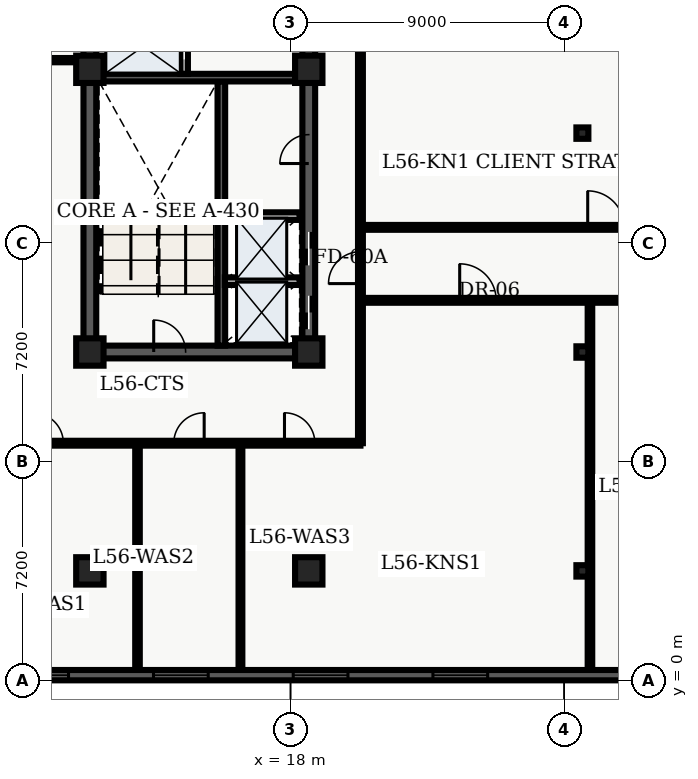
"""IFC4 building model, lengths in metres.
Left out: names, types, materials, properties, quantities, classifications, styles, units other than length and angle.
Written with IfcOpenShell. Run it as: python <this file> out.ifc"""

import sys

from ifc_helpers import new_model, entity, si_unit, converted_unit, direction, frame, origin_with_axes, origin_2d_with_axis, place, context, subcontext, project, spatial, polyline, rectangle, i_section, outline, extrude, element, fill, save


model = new_model("IFC4")
c1 = context("Model", 3, precision=1e-05, world=origin_with_axes(), true_north=direction((0.0, 1.0)))
c2 = subcontext(c1, "Body", "Model", "MODEL_VIEW")
j1 = project(units=[si_unit("LENGTHUNIT", "METRE"), converted_unit("PLANEANGLEUNIT", "DEGREE", entity("IfcPlaneAngleMeasure", 0.017), si_unit("PLANEANGLEUNIT", "RADIAN"), dimensions=[0, 0, 0, 0, 0, 0, 0])], contexts=[c1])
p1 = place(None, origin_with_axes())
s1 = spatial("IfcSite", under=j1, at=p1, CompositionType="ELEMENT")
p2 = place(p1, origin_with_axes())
s2 = spatial("IfcBuilding", under=s1, at=p2, CompositionType="ELEMENT")
p3 = place(p2, frame((0.0, 0.0, 228.6), z_axis=(0.0, 0.0, 1.0), x_axis=(1.0, 0.0, 0.0)))
s3 = spatial("IfcBuildingStorey", under=s2, at=p3, CompositionType="ELEMENT", Elevation=228.6)
p4 = place(p3, frame((11.4, 10.8, 0.0), z_axis=(0.0, 0.0, 1.0), x_axis=(0.0, 1.0, 0.0)))
e1 = element("IfcWall", 1, at=p4, inside=s3, PredefinedType="SHEAR", context=c2, shape_type="SweptSolid", body=[
    extrude(outline(polyline([(0.0, -0.21), (27.0, -0.21), (27.0, 0.21), (0.0, 0.21), (0.0, -0.21)])), origin_with_axes(), (0.0, 0.0, 1.0), 3.66),
])
p5 = place(p3, frame((11.4, 10.8, 0.0), z_axis=(0.0, 0.0, 1.0), x_axis=(1.0, 0.0, 0.0)))
e2 = element("IfcWall", 2, at=p5, inside=s3, PredefinedType="SHEAR", context=c2, shape_type="SweptSolid", body=[
    extrude(outline(polyline([(0.0, -0.21), (7.2, -0.21), (7.2, 0.21), (0.0, 0.21), (0.0, -0.21)])), origin_with_axes(), (0.0, 0.0, 1.0), 3.66),
])
p6 = place(p5, frame((2.625, 0.0, 0.0), z_axis=(0.0, 0.0, 1.0), x_axis=(1.0, 0.0, 0.0)))
e3 = element("IfcOpeningElement", 3, at=p6, cuts=e2, PredefinedType="OPENING", context=c2, shape_type="SweptSolid", body=[
    extrude(rectangle(XDim=1.05, YDim=0.44, at=origin_2d_with_axis()), origin_with_axes(), (0.0, 0.0, 1.0), 2.15),
])
p7 = place(p3, frame((18.6, 10.8, 0.0), z_axis=(0.0, 0.0, 1.0), x_axis=(0.0, 1.0, 0.0)))
e4 = element("IfcWall", 4, at=p7, inside=s3, PredefinedType="SHEAR", context=c2, shape_type="SweptSolid", body=[
    extrude(outline(polyline([(0.0, -0.21), (13.5, -0.21), (13.5, 0.21), (0.0, 0.21), (0.0, -0.21)])), origin_with_axes(), (0.0, 0.0, 1.0), 3.66),
])
p8 = place(p7, frame((1.3, 0.0, 0.0), z_axis=(0.0, 0.0, 1.0), x_axis=(1.0, 0.0, 0.0)))
e5 = element("IfcOpeningElement", 5, at=p8, cuts=e4, PredefinedType="OPENING", context=c2, shape_type="SweptSolid", body=[
    extrude(rectangle(XDim=1.1, YDim=0.44, at=origin_2d_with_axis()), origin_with_axes(), (0.0, 0.0, 1.0), 2.15),
])
p9 = place(p7, frame((3.4, 0.0, 0.0), z_axis=(0.0, 0.0, 1.0), x_axis=(1.0, 0.0, 0.0)))
e6 = element("IfcOpeningElement", 6, at=p9, cuts=e4, PredefinedType="OPENING", context=c2, shape_type="SweptSolid", body=[
    extrude(rectangle(XDim=1.1, YDim=0.44, at=origin_2d_with_axis()), origin_with_axes(), (0.0, 0.0, 1.0), 2.15),
])
p10 = place(p7, frame((11.125, 0.0, 0.0), z_axis=(0.0, 0.0, 1.0), x_axis=(1.0, 0.0, 0.0)))
e7 = element("IfcOpeningElement", 7, at=p10, cuts=e4, PredefinedType="OPENING", context=c2, shape_type="SweptSolid", body=[
    extrude(rectangle(XDim=1.05, YDim=0.44, at=origin_2d_with_axis()), origin_with_axes(), (0.0, 0.0, 1.0), 2.15),
])
p11 = place(p7, frame((6.675, 0.0, 0.0), z_axis=(0.0, 0.0, 1.0), x_axis=(1.0, 0.0, 0.0)))
e8 = element("IfcOpeningElement", 8, at=p11, cuts=e4, PredefinedType="OPENING", context=c2, shape_type="SweptSolid", body=[
    extrude(rectangle(XDim=0.95, YDim=0.44, at=origin_2d_with_axis()), origin_with_axes(), (0.0, 0.0, 1.0), 2.15),
])
p12 = place(p3, frame((15.725, 11.01, 0.0), z_axis=(0.0, 0.0, 1.0), x_axis=(0.0, 1.0, 0.0)))
e9 = element("IfcWall", 9, at=p12, inside=s3, PredefinedType="SHEAR", context=c2, shape_type="SweptSolid", body=[
    extrude(outline(polyline([(0.0, -0.125), (8.69, -0.125), (8.69, 0.125), (0.0, 0.125), (0.0, -0.125)])), origin_with_axes(), (0.0, 0.0, 1.0), 3.66),
])
p13 = place(p3, frame((11.61, 19.825, 0.0), z_axis=(0.0, 0.0, 1.0), x_axis=(1.0, 0.0, 0.0)))
e10 = element("IfcWall", 10, at=p13, inside=s3, PredefinedType="SHEAR", context=c2, shape_type="SweptSolid", body=[
    extrude(outline(polyline([(0.0, -0.125), (6.78, -0.125), (6.78, 0.125), (0.0, 0.125), (0.0, -0.125)])), origin_with_axes(), (0.0, 0.0, 1.0), 3.66),
])
p14 = place(p3, frame((14.5, 19.95, 0.0), z_axis=(0.0, 0.0, 1.0), x_axis=(0.0, 1.0, 0.0)))
e11 = element("IfcWall", 11, at=p14, inside=s3, PredefinedType="SOLIDWALL", context=c2, shape_type="SweptSolid", body=[
    extrude(outline(polyline([(0.0, -0.125), (6.25, -0.125), (6.25, 0.125), (0.0, 0.125), (0.0, -0.125)])), origin_with_axes(), (0.0, 0.0, 1.0), 2.7),
])
p15 = place(p14, frame((1.025, 0.0, 0.0), z_axis=(0.0, 0.0, 1.0), x_axis=(1.0, 0.0, 0.0)))
e12 = element("IfcOpeningElement", 12, at=p15, cuts=e11, PredefinedType="OPENING", context=c2, shape_type="SweptSolid", body=[
    extrude(rectangle(XDim=1.1, YDim=0.27, at=origin_2d_with_axis()), origin_with_axes(), (0.0, 0.0, 1.0), 2.15),
])
p16 = place(p14, frame((2.975, 0.0, 0.0), z_axis=(0.0, 0.0, 1.0), x_axis=(1.0, 0.0, 0.0)))
e13 = element("IfcOpeningElement", 13, at=p16, cuts=e11, PredefinedType="OPENING", context=c2, shape_type="SweptSolid", body=[
    extrude(rectangle(XDim=1.1, YDim=0.27, at=origin_2d_with_axis()), origin_with_axes(), (0.0, 0.0, 1.0), 2.15),
])
p17 = place(p14, frame((5.425, 0.0, 0.0), z_axis=(0.0, 0.0, 1.0), x_axis=(1.0, 0.0, 0.0)))
e14 = element("IfcOpeningElement", 14, at=p17, cuts=e11, PredefinedType="OPENING", context=c2, shape_type="SweptSolid", body=[
    extrude(rectangle(XDim=1.2, YDim=0.27, at=origin_2d_with_axis()), origin_with_axes(), (0.0, 0.0, 1.0), 2.15),
])
for number, where, z_axis, x_axis in (
    (15, (11.4, 3.6, 0.0), (0.0, 0.0, 1.0), (1.0, 0.0, 0.0)),
    (16, (11.4, 10.8, 0.0), (0.0, 0.0, 1.0), (1.0, 0.0, 0.0)),
    (17, (11.4, 20.1, 0.0), (0.0, 0.0, 1.0), (1.0, 0.0, 0.0)),
    (18, (18.6, 3.6, 0.0), (0.0, 0.0, 1.0), (1.0, 0.0, 0.0)),
    (19, (18.6, 10.8, 0.0), (0.0, 0.0, 1.0), (1.0, 0.0, 0.0)),
    (20, (18.6, 20.1, 0.0), (0.0, 0.0, 1.0), (1.0, 0.0, 0.0)),
):
    element("IfcColumn", number, at=place(p3, frame(where, z_axis=z_axis, x_axis=x_axis)), inside=s3, PredefinedType="COLUMN", context=c2, shape_type="SweptSolid", body=[
        extrude(rectangle(XDim=0.9, YDim=0.9, at=origin_2d_with_axis()), origin_with_axes(), (0.0, 0.0, 1.0), 3.9),
    ])
for number, where, z_axis, x_axis in (
    (21, (27.6, 3.6, 0.0), (0.0, 0.0, 1.0), (1.0, 0.0, 0.0)),
    (22, (27.6, 10.8, 0.0), (0.0, 0.0, 1.0), (1.0, 0.0, 0.0)),
    (23, (27.6, 18.0, 0.0), (0.0, 0.0, 1.0), (1.0, 0.0, 0.0)),
):
    element("IfcColumn", number, at=place(p3, frame(where, z_axis=z_axis, x_axis=x_axis)), inside=s3, PredefinedType="COLUMN", context=c2, shape_type="SweptSolid", body=[
        extrude(i_section(OverallWidth=0.394, OverallDepth=0.375, WebThickness=0.017, FlangeThickness=0.028, FilletRadius=0.02, at=origin_2d_with_axis()), origin_with_axes(), (0.0, 0.0, 1.0), 3.9),
    ])
for number, where, z_axis, x_axis in (
    (24, (15.84, 13.13, 0.0), (0.0, 0.0, 1.0), (1.0, 0.0, 0.0)),
    (25, (15.84, 15.27, 0.0), (0.0, 0.0, 1.0), (1.0, 0.0, 0.0)),
):
    element("IfcWall", number, at=place(p3, frame(where, z_axis=z_axis, x_axis=x_axis)), inside=s3, PredefinedType="SOLIDWALL", context=c2, shape_type="SweptSolid", body=[
        extrude(outline(polyline([(0.0, -0.125), (2.46, -0.125), (2.46, 0.125), (0.0, 0.125), (0.0, -0.125)])), origin_with_axes(), (0.0, 0.0, 1.0), 2.7),
    ])
p18 = place(p3, frame((9.52, 20.4, 0.0), z_axis=(0.0, 0.0, 1.0), x_axis=(1.0, 0.0, 0.0)))
e26 = element("IfcWall", 26, at=p18, inside=s3, PredefinedType="PARTITIONING", context=c2, shape_type="SweptSolid", body=[
    extrude(outline(polyline([(0.0, -0.07), (1.58, -0.07), (1.58, 0.07), (0.0, 0.07), (0.0, -0.07)])), origin_with_axes(), (0.0, 0.0, 1.0), 2.7),
])
p19 = place(p3, frame((7.1, 7.8, 0.0), z_axis=(0.0, 0.0, 1.0), x_axis=(1.0, 0.0, 0.0)))
e27 = element("IfcWall", 27, at=p19, inside=s3, PredefinedType="PARTITIONING", context=c2, shape_type="SweptSolid", body=[
    extrude(outline(polyline([(0.0, -0.08), (13.2, -0.08), (13.2, 0.08), (0.0, 0.08), (0.0, -0.08)])), origin_with_axes(), (0.0, 0.0, 1.0), 2.7),
])
p20 = place(p19, frame((2.929, 0.0, 0.0), z_axis=(0.0, 0.0, 1.0), x_axis=(1.0, 0.0, 0.0)))
e28 = element("IfcOpeningElement", 28, at=p20, cuts=e27, PredefinedType="OPENING", context=c2, shape_type="SweptSolid", body=[
    extrude(rectangle(XDim=1.0, YDim=0.18, at=origin_2d_with_axis()), origin_with_axes(), (0.0, 0.0, 1.0), 2.15),
])
p21 = place(p19, frame((7.56, 0.0, 0.0), z_axis=(0.0, 0.0, 1.0), x_axis=(1.0, 0.0, 0.0)))
e29 = element("IfcOpeningElement", 29, at=p21, cuts=e27, PredefinedType="OPENING", context=c2, shape_type="SweptSolid", body=[
    extrude(rectangle(XDim=1.0, YDim=0.18, at=origin_2d_with_axis()), origin_with_axes(), (0.0, 0.0, 1.0), 2.15),
])
p22 = place(p19, frame((11.201, 0.0, 0.0), z_axis=(0.0, 0.0, 1.0), x_axis=(1.0, 0.0, 0.0)))
e30 = element("IfcOpeningElement", 30, at=p22, cuts=e27, PredefinedType="OPENING", context=c2, shape_type="SweptSolid", body=[
    extrude(rectangle(XDim=1.0, YDim=0.18, at=origin_2d_with_axis()), origin_with_axes(), (0.0, 0.0, 1.0), 2.15),
])
p23 = place(p3, frame((20.3, 7.8, 0.0), z_axis=(0.0, 0.0, 1.0), x_axis=(0.0, 1.0, 0.0)))
e31 = element("IfcWall", 31, at=p23, inside=s3, PredefinedType="PARTITIONING", context=c2, shape_type="SweptSolid", body=[
    extrude(outline(polyline([(0.0, -0.08), (32.7, -0.08), (32.7, 0.08), (0.0, 0.08), (0.0, -0.08)])), origin_with_axes(), (0.0, 0.0, 1.0), 2.7),
])
p24 = place(p23, frame((14.556, 0.0, 0.0), z_axis=(0.0, 0.0, 1.0), x_axis=(1.0, 0.0, 0.0)))
e32 = element("IfcOpeningElement", 32, at=p24, cuts=e31, PredefinedType="OPENING", context=c2, shape_type="SweptSolid", body=[
    extrude(rectangle(XDim=0.9, YDim=0.18, at=origin_2d_with_axis()), origin_with_axes(), (0.0, 0.0, 1.0), 2.15),
])
p25 = place(p23, frame((18.551, 0.0, 0.0), z_axis=(0.0, 0.0, 1.0), x_axis=(1.0, 0.0, 0.0)))
e33 = element("IfcOpeningElement", 33, at=p25, cuts=e31, PredefinedType="OPENING", context=c2, shape_type="SweptSolid", body=[
    extrude(rectangle(XDim=1.0, YDim=0.18, at=origin_2d_with_axis()), origin_with_axes(), (0.0, 0.0, 1.0), 2.15),
])
p26 = place(p23, frame((22.226, 0.0, 0.0), z_axis=(0.0, 0.0, 1.0), x_axis=(1.0, 0.0, 0.0)))
e34 = element("IfcOpeningElement", 34, at=p26, cuts=e31, PredefinedType="OPENING", context=c2, shape_type="SweptSolid", body=[
    extrude(rectangle(XDim=1.0, YDim=0.18, at=origin_2d_with_axis()), origin_with_axes(), (0.0, 0.0, 1.0), 2.15),
])
p27 = place(p23, frame((25.754, 0.0, 0.0), z_axis=(0.0, 0.0, 1.0), x_axis=(1.0, 0.0, 0.0)))
e35 = element("IfcOpeningElement", 35, at=p27, cuts=e31, PredefinedType="OPENING", context=c2, shape_type="SweptSolid", body=[
    extrude(rectangle(XDim=1.0, YDim=0.18, at=origin_2d_with_axis()), origin_with_axes(), (0.0, 0.0, 1.0), 2.15),
])
p28 = place(p23, frame((5.775, 0.0, 0.0), z_axis=(0.0, 0.0, 1.0), x_axis=(1.0, 0.0, 0.0)))
e36 = element("IfcOpeningElement", 36, at=p28, cuts=e31, PredefinedType="OPENING", context=c2, shape_type="SweptSolid", body=[
    extrude(rectangle(XDim=1.05, YDim=0.18, at=origin_2d_with_axis()), origin_with_axes(), (0.0, 0.0, 1.0), 2.15),
])
p29 = place(p3, frame((12.967, 0.335, 0.0), z_axis=(0.0, 0.0, 1.0), x_axis=(0.0, 1.0, 0.0)))
e37 = element("IfcWall", 37, at=p29, inside=s3, PredefinedType="PARTITIONING", context=c2, shape_type="SweptSolid", body=[
    extrude(outline(polyline([(0.0, -0.075), (7.365, -0.075), (7.365, 0.075), (0.0, 0.075), (0.0, -0.075)])), origin_with_axes(), (0.0, 0.0, 1.0), 2.7),
])
p30 = place(p3, frame((16.353, 0.335, 0.0), z_axis=(0.0, 0.0, 1.0), x_axis=(0.0, 1.0, 0.0)))
e38 = element("IfcWall", 38, at=p30, inside=s3, PredefinedType="PARTITIONING", context=c2, shape_type="SweptSolid", body=[
    extrude(outline(polyline([(0.0, -0.062), (7.365, -0.062), (7.365, 0.062), (0.0, 0.062), (0.0, -0.062)])), origin_with_axes(), (0.0, 0.0, 1.0), 2.7),
])
p31 = place(p3, frame((20.3, 12.5, 0.0), z_axis=(0.0, 0.0, 1.0), x_axis=(1.0, 0.0, 0.0)))
e39 = element("IfcWall", 39, at=p31, inside=s3, PredefinedType="PARTITIONING", context=c2, shape_type="SweptSolid", body=[
    extrude(outline(polyline([(0.0, -0.08), (16.05, -0.08), (16.05, 0.08), (0.0, 0.08), (0.0, -0.08)])), origin_with_axes(), (0.0, 0.0, 1.0), 2.7),
])
p32 = place(p31, frame((3.865, 0.0, 0.0), z_axis=(0.0, 0.0, 1.0), x_axis=(1.0, 0.0, 0.0)))
e40 = element("IfcOpeningElement", 40, at=p32, cuts=e39, PredefinedType="OPENING", context=c2, shape_type="SweptSolid", body=[
    extrude(rectangle(XDim=1.2, YDim=0.18, at=origin_2d_with_axis()), origin_with_axes(), (0.0, 0.0, 1.0), 2.2),
])
p33 = place(p31, frame((9.48, 0.0, 0.0), z_axis=(0.0, 0.0, 1.0), x_axis=(1.0, 0.0, 0.0)))
e41 = element("IfcOpeningElement", 41, at=p33, cuts=e39, PredefinedType="OPENING", context=c2, shape_type="SweptSolid", body=[
    extrude(rectangle(XDim=1.0, YDim=0.18, at=origin_2d_with_axis()), origin_with_axes(), (0.0, 0.0, 1.0), 2.15),
])
p34 = place(p31, frame((13.691, 0.0, 0.0), z_axis=(0.0, 0.0, 1.0), x_axis=(1.0, 0.0, 0.0)))
e42 = element("IfcOpeningElement", 42, at=p34, cuts=e39, PredefinedType="OPENING", context=c2, shape_type="SweptSolid", body=[
    extrude(rectangle(XDim=1.0, YDim=0.18, at=origin_2d_with_axis()), origin_with_axes(), (0.0, 0.0, 1.0), 2.15),
])
p35 = place(p3, frame((20.3, 14.9, 0.0), z_axis=(0.0, 0.0, 1.0), x_axis=(1.0, 0.0, 0.0)))
e43 = element("IfcWall", 43, at=p35, inside=s3, PredefinedType="PARTITIONING", context=c2, shape_type="SweptSolid", body=[
    extrude(outline(polyline([(0.0, -0.08), (16.05, -0.08), (16.05, 0.08), (0.0, 0.08), (0.0, -0.08)])), origin_with_axes(), (0.0, 0.0, 1.0), 2.7),
])
p36 = place(p35, frame((8.075, 0.0, 0.0), z_axis=(0.0, 0.0, 1.0), x_axis=(1.0, 0.0, 0.0)))
e44 = element("IfcOpeningElement", 44, at=p36, cuts=e43, PredefinedType="OPENING", context=c2, shape_type="SweptSolid", body=[
    extrude(rectangle(XDim=1.2, YDim=0.18, at=origin_2d_with_axis()), origin_with_axes(), (0.0, 0.0, 1.0), 2.2),
])
p37 = place(p3, frame((27.849, 0.335, 0.0), z_axis=(0.0, 0.0, 1.0), x_axis=(0.0, 1.0, 0.0)))
e45 = element("IfcWall", 45, at=p37, inside=s3, PredefinedType="PARTITIONING", context=c2, shape_type="SweptSolid", body=[
    extrude(outline(polyline([(0.0, -0.075), (12.045, -0.075), (12.045, 0.075), (0.0, 0.075), (0.0, -0.075)])), origin_with_axes(), (0.0, 0.0, 1.0), 2.7),
])
p38 = place(p3, frame((49.46, 0.17, 0.0), z_axis=(0.0, 0.0, 1.0), x_axis=(-1.0, 0.0, 0.0)))
e46 = element("IfcWall", 46, at=p38, inside=s3, PredefinedType="SOLIDWALL", context=c2, shape_type="SweptSolid", body=[
    extrude(outline(polyline([(0.0, -0.17), (42.56, -0.17), (42.56, 0.17), (0.0, 0.17), (0.0, -0.17)])), origin_with_axes(), (0.0, 0.0, 1.0), 3.66),
])
p39 = place(p38, frame((2.898, 0.0, 0.45), z_axis=(0.0, 0.0, 1.0), x_axis=(1.0, 0.0, 0.0)))
e47 = element("IfcOpeningElement", 47, at=p39, cuts=e46, PredefinedType="OPENING", context=c2, shape_type="SweptSolid", body=[
    extrude(rectangle(XDim=1.8, YDim=0.36, at=origin_2d_with_axis()), origin_with_axes(), (0.0, 0.0, 1.0), 2.1),
])
p40 = place(p38, frame((7.493, 0.0, 0.45), z_axis=(0.0, 0.0, 1.0), x_axis=(1.0, 0.0, 0.0)))
e48 = element("IfcOpeningElement", 48, at=p40, cuts=e46, PredefinedType="OPENING", context=c2, shape_type="SweptSolid", body=[
    extrude(rectangle(XDim=1.8, YDim=0.36, at=origin_2d_with_axis()), origin_with_axes(), (0.0, 0.0, 1.0), 2.1),
])
p41 = place(p38, frame((12.089, 0.0, 0.45), z_axis=(0.0, 0.0, 1.0), x_axis=(1.0, 0.0, 0.0)))
e49 = element("IfcOpeningElement", 49, at=p41, cuts=e46, PredefinedType="OPENING", context=c2, shape_type="SweptSolid", body=[
    extrude(rectangle(XDim=1.8, YDim=0.36, at=origin_2d_with_axis()), origin_with_axes(), (0.0, 0.0, 1.0), 2.1),
])
p42 = place(p38, frame((16.234, 0.0, 0.45), z_axis=(0.0, 0.0, 1.0), x_axis=(1.0, 0.0, 0.0)))
e50 = element("IfcOpeningElement", 50, at=p42, cuts=e46, PredefinedType="OPENING", context=c2, shape_type="SweptSolid", body=[
    extrude(rectangle(XDim=1.8, YDim=0.36, at=origin_2d_with_axis()), origin_with_axes(), (0.0, 0.0, 1.0), 2.1),
])
p43 = place(p38, frame((25.876, 0.0, 0.45), z_axis=(0.0, 0.0, 1.0), x_axis=(1.0, 0.0, 0.0)))
e51 = element("IfcOpeningElement", 51, at=p43, cuts=e46, PredefinedType="OPENING", context=c2, shape_type="SweptSolid", body=[
    extrude(rectangle(XDim=1.8, YDim=0.36, at=origin_2d_with_axis()), origin_with_axes(), (0.0, 0.0, 1.0), 2.1),
])
p44 = place(p38, frame((30.471, 0.0, 0.45), z_axis=(0.0, 0.0, 1.0), x_axis=(1.0, 0.0, 0.0)))
e52 = element("IfcOpeningElement", 52, at=p44, cuts=e46, PredefinedType="OPENING", context=c2, shape_type="SweptSolid", body=[
    extrude(rectangle(XDim=1.8, YDim=0.36, at=origin_2d_with_axis()), origin_with_axes(), (0.0, 0.0, 1.0), 2.1),
])
p45 = place(p38, frame((35.067, 0.0, 0.45), z_axis=(0.0, 0.0, 1.0), x_axis=(1.0, 0.0, 0.0)))
e53 = element("IfcOpeningElement", 53, at=p45, cuts=e46, PredefinedType="OPENING", context=c2, shape_type="SweptSolid", body=[
    extrude(rectangle(XDim=1.8, YDim=0.36, at=origin_2d_with_axis()), origin_with_axes(), (0.0, 0.0, 1.0), 2.1),
])
p46 = place(p38, frame((39.662, 0.0, 0.45), z_axis=(0.0, 0.0, 1.0), x_axis=(1.0, 0.0, 0.0)))
e54 = element("IfcOpeningElement", 54, at=p46, cuts=e46, PredefinedType="OPENING", context=c2, shape_type="SweptSolid", body=[
    extrude(rectangle(XDim=1.8, YDim=0.36, at=origin_2d_with_axis()), origin_with_axes(), (0.0, 0.0, 1.0), 2.1),
])
p47 = place(p7, frame((1.3, 0.0, 0.0), z_axis=(0.0, 0.0, 1.0), x_axis=(1.0, 0.0, 0.0)))
e55 = element("IfcDoor", 55, at=p47, inside=s3, OperationType="SLIDING_TO_LEFT", PredefinedType="DOOR", context=c2, shape_type="SweptSolid", body=[
    extrude(rectangle(XDim=1.1, YDim=0.09, at=origin_2d_with_axis()), origin_with_axes(), (0.0, 0.0, 1.0), 2.15),
])
fill(e5, e55)
p48 = place(p7, frame((3.4, 0.0, 0.0), z_axis=(0.0, 0.0, 1.0), x_axis=(1.0, 0.0, 0.0)))
e56 = element("IfcDoor", 56, at=p48, inside=s3, OperationType="SLIDING_TO_RIGHT", PredefinedType="DOOR", context=c2, shape_type="SweptSolid", body=[
    extrude(rectangle(XDim=1.1, YDim=0.09, at=origin_2d_with_axis()), origin_with_axes(), (0.0, 0.0, 1.0), 2.15),
])
fill(e6, e56)
p49 = place(p14, frame((1.025, 0.0, 0.0), z_axis=(0.0, 0.0, 1.0), x_axis=(1.0, 0.0, 0.0)))
e57 = element("IfcDoor", 57, at=p49, inside=s3, OperationType="SLIDING_TO_LEFT", PredefinedType="DOOR", context=c2, shape_type="SweptSolid", body=[
    extrude(rectangle(XDim=1.1, YDim=0.09, at=origin_2d_with_axis()), origin_with_axes(), (0.0, 0.0, 1.0), 2.15),
])
fill(e12, e57)
p50 = place(p5, frame((2.625, 0.0, 0.0), z_axis=(0.0, 0.0, 1.0), x_axis=(1.0, 0.0, 0.0)))
e58 = element("IfcDoor", 58, at=p50, inside=s3, OperationType="SINGLE_SWING_LEFT", PredefinedType="DOOR", context=c2, shape_type="SweptSolid", body=[
    extrude(rectangle(XDim=1.05, YDim=0.09, at=origin_2d_with_axis()), origin_with_axes(), (0.0, 0.0, 1.0), 2.15),
])
fill(e3, e58)
p51 = place(p7, frame((6.675, 0.0, 0.0), z_axis=(0.0, 0.0, 1.0), x_axis=(1.0, 0.0, 0.0)))
e59 = element("IfcDoor", 59, at=p51, inside=s3, OperationType="SINGLE_SWING_LEFT", PredefinedType="DOOR", context=c2, shape_type="SweptSolid", body=[
    extrude(rectangle(XDim=0.95, YDim=0.09, at=origin_2d_with_axis()), origin_with_axes(), (0.0, 0.0, 1.0), 2.15),
])
fill(e8, e59)
p52 = place(p19, frame((2.929, 0.0, 0.0), z_axis=(0.0, 0.0, 1.0), x_axis=(1.0, 0.0, 0.0)))
e60 = element("IfcDoor", 60, at=p52, inside=s3, OperationType="SINGLE_SWING_LEFT", PredefinedType="DOOR", context=c2, shape_type="SweptSolid", body=[
    extrude(rectangle(XDim=1.0, YDim=0.09, at=origin_2d_with_axis()), origin_with_axes(), (0.0, 0.0, 1.0), 2.15),
])
fill(e28, e60)
p53 = place(p19, frame((7.56, 0.0, 0.0), z_axis=(0.0, 0.0, 1.0), x_axis=(1.0, 0.0, 0.0)))
e61 = element("IfcDoor", 61, at=p53, inside=s3, OperationType="SINGLE_SWING_RIGHT", PredefinedType="DOOR", context=c2, shape_type="SweptSolid", body=[
    extrude(rectangle(XDim=1.0, YDim=0.09, at=origin_2d_with_axis()), origin_with_axes(), (0.0, 0.0, 1.0), 2.15),
])
fill(e29, e61)
p54 = place(p19, frame((11.201, 0.0, 0.0), z_axis=(0.0, 0.0, 1.0), x_axis=(1.0, 0.0, 0.0)))
e62 = element("IfcDoor", 62, at=p54, inside=s3, OperationType="SINGLE_SWING_LEFT", PredefinedType="DOOR", context=c2, shape_type="SweptSolid", body=[
    extrude(rectangle(XDim=1.0, YDim=0.09, at=origin_2d_with_axis()), origin_with_axes(), (0.0, 0.0, 1.0), 2.15),
])
fill(e30, e62)
p55 = place(p23, frame((5.775, 0.0, 0.0), z_axis=(0.0, 0.0, 1.0), x_axis=(1.0, 0.0, 0.0)))
e63 = element("IfcDoor", 63, at=p55, inside=s3, OperationType="SINGLE_SWING_LEFT", PredefinedType="DOOR", context=c2, shape_type="SweptSolid", body=[
    extrude(rectangle(XDim=1.05, YDim=0.09, at=origin_2d_with_axis()), origin_with_axes(), (0.0, 0.0, 1.0), 2.15),
])
fill(e36, e63)
p56 = place(p31, frame((3.865, 0.0, 0.0), z_axis=(0.0, 0.0, 1.0), x_axis=(1.0, 0.0, 0.0)))
e64 = element("IfcDoor", 64, at=p56, inside=s3, OperationType="SINGLE_SWING_LEFT", PredefinedType="DOOR", context=c2, shape_type="SweptSolid", body=[
    extrude(rectangle(XDim=1.2, YDim=0.09, at=origin_2d_with_axis()), origin_with_axes(), (0.0, 0.0, 1.0), 2.2),
])
fill(e40, e64)
p57 = place(p35, frame((8.075, 0.0, 0.0), z_axis=(0.0, 0.0, 1.0), x_axis=(1.0, 0.0, 0.0)))
e65 = element("IfcDoor", 65, at=p57, inside=s3, OperationType="SINGLE_SWING_LEFT", PredefinedType="DOOR", context=c2, shape_type="SweptSolid", body=[
    extrude(rectangle(XDim=1.2, YDim=0.09, at=origin_2d_with_axis()), origin_with_axes(), (0.0, 0.0, 1.0), 2.2),
])
fill(e44, e65)
p58 = place(p38, frame((25.876, 0.0, 0.45), z_axis=(0.0, 0.0, 1.0), x_axis=(1.0, 0.0, 0.0)))
e66 = element("IfcWindow", 66, at=p58, inside=s3, PredefinedType="WINDOW", context=c2, shape_type="SweptSolid", body=[
    extrude(rectangle(XDim=1.8, YDim=0.09, at=origin_2d_with_axis()), origin_with_axes(), (0.0, 0.0, 1.0), 2.1),
])
fill(e51, e66)
p59 = place(p38, frame((30.471, 0.0, 0.45), z_axis=(0.0, 0.0, 1.0), x_axis=(1.0, 0.0, 0.0)))
e67 = element("IfcWindow", 67, at=p59, inside=s3, PredefinedType="WINDOW", context=c2, shape_type="SweptSolid", body=[
    extrude(rectangle(XDim=1.8, YDim=0.09, at=origin_2d_with_axis()), origin_with_axes(), (0.0, 0.0, 1.0), 2.1),
])
fill(e52, e67)
p60 = place(p38, frame((35.067, 0.0, 0.45), z_axis=(0.0, 0.0, 1.0), x_axis=(1.0, 0.0, 0.0)))
e68 = element("IfcWindow", 68, at=p60, inside=s3, PredefinedType="WINDOW", context=c2, shape_type="SweptSolid", body=[
    extrude(rectangle(XDim=1.8, YDim=0.09, at=origin_2d_with_axis()), origin_with_axes(), (0.0, 0.0, 1.0), 2.1),
])
fill(e53, e68)
p61 = place(p38, frame((39.662, 0.0, 0.45), z_axis=(0.0, 0.0, 1.0), x_axis=(1.0, 0.0, 0.0)))
e69 = element("IfcWindow", 69, at=p61, inside=s3, PredefinedType="WINDOW", context=c2, shape_type="SweptSolid", body=[
    extrude(rectangle(XDim=1.8, YDim=0.09, at=origin_2d_with_axis()), origin_with_axes(), (0.0, 0.0, 1.0), 2.1),
])
fill(e54, e69)
save(model, sys.argv[1])
